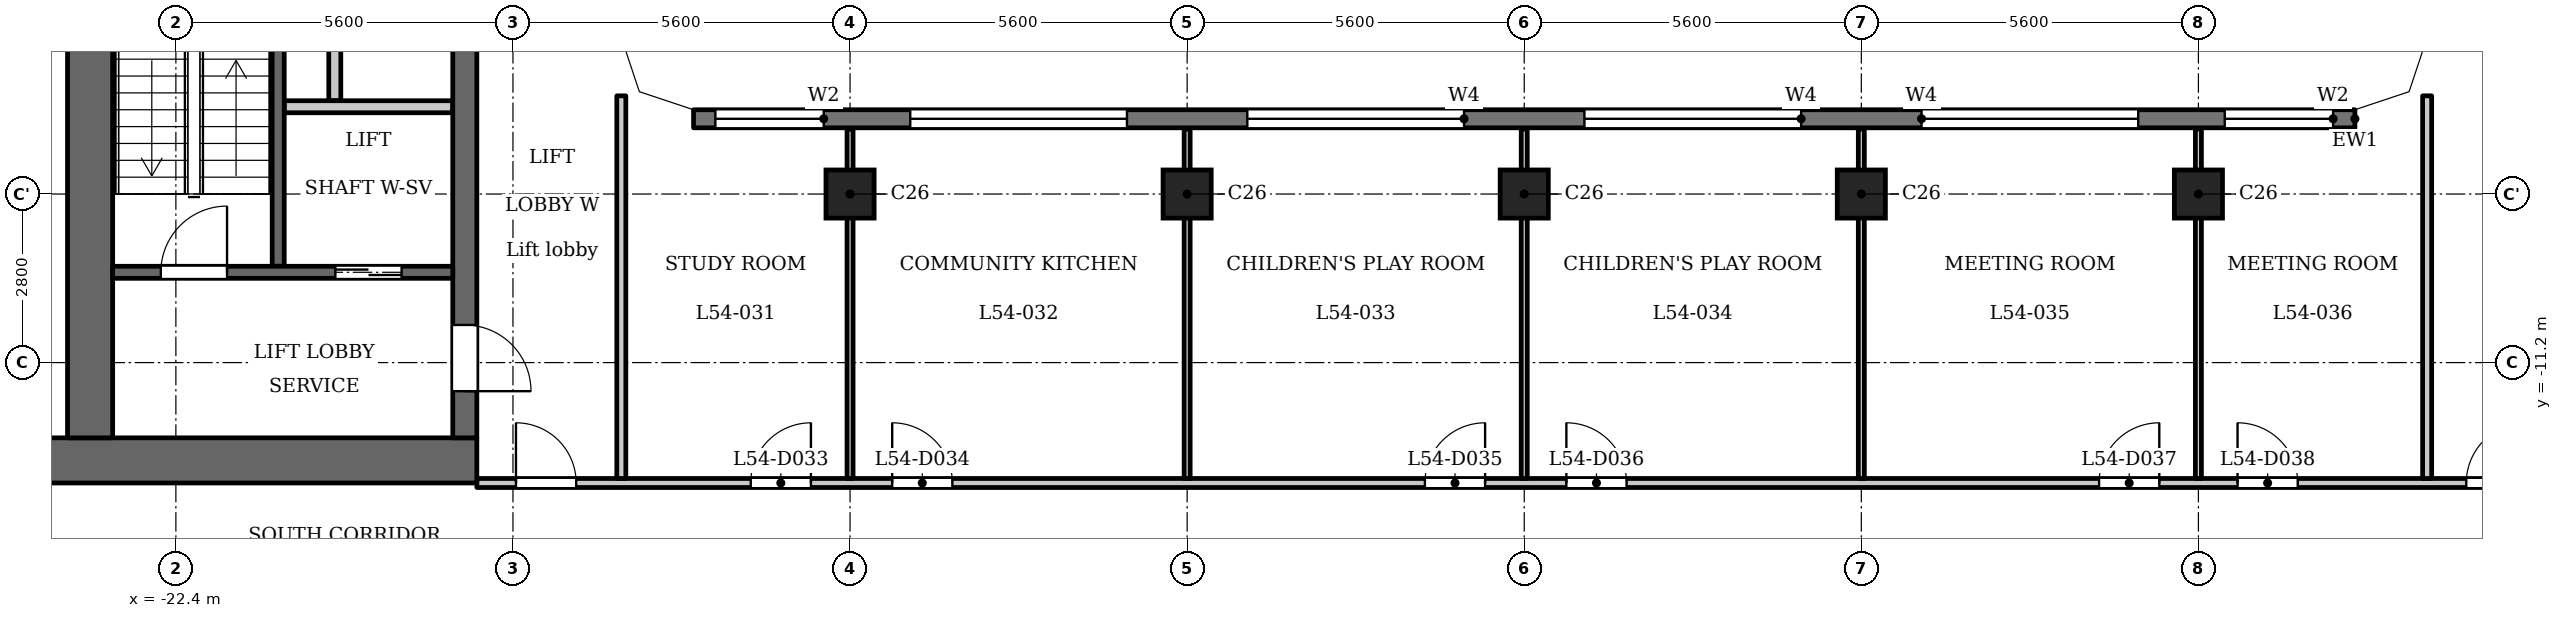
"""IFC4 building model, lengths in metres.
Left out: names, types, materials, properties, quantities, classifications, styles, units other than length and angle.
Written with IfcOpenShell. Run it as: python <this file> out.ifc"""

import sys

from ifc_helpers import new_model, si_unit, direction, frame, frame_2d, origin, origin_2d, place, context, subcontext, project, spatial, polyline, rectangle, outline, extrude, element, fill, save


model = new_model("IFC4")
c1 = context("Model", 3, precision=1e-05, world=origin(), true_north=direction((0.0, 1.0)))
c2 = subcontext(c1, "Body", "Model", "MODEL_VIEW")
j1 = project(units=[si_unit("LENGTHUNIT", "METRE"), si_unit("PLANEANGLEUNIT", "RADIAN")], contexts=[c1])
p1 = place(None, origin())
s1 = spatial("IfcSite", under=j1, at=p1, CompositionType="ELEMENT")
p2 = place(p1, origin())
s2 = spatial("IfcBuilding", under=s1, at=p2, CompositionType="ELEMENT")
p3 = place(p2, frame((0.0, 0.0, 209.9)))
s3 = spatial("IfcBuildingStorey", under=s2, at=p3, CompositionType="ELEMENT", Elevation=209.9)
for number, where, z_axis, x_axis in (
    (1, (-11.2, -8.4, 0.0), (0.0, 0.0, 1.0), (1.0, 0.0, 0.0)),
    (2, (-5.6, -8.4, 0.0), (0.0, 0.0, 1.0), (1.0, 0.0, 0.0)),
    (3, (0.0, -8.4, 0.0), (0.0, 0.0, 1.0), (1.0, 0.0, 0.0)),
    (4, (5.6, -8.4, 0.0), (0.0, 0.0, 1.0), (1.0, 0.0, 0.0)),
    (5, (11.2, -8.4, 0.0), (0.0, 0.0, 1.0), (1.0, 0.0, 0.0)),
):
    element("IfcColumn", number, at=place(p3, frame(where, z_axis=z_axis, x_axis=x_axis)), inside=s3, PredefinedType="COLUMN", context=c2, shape_type="SweptSolid", body=[
        extrude(rectangle(XDim=0.8, YDim=0.8, at=origin_2d()), origin(), (0.0, 0.0, 1.0), 3.5),
    ])
p4 = place(p3, frame((13.8, -7.15, 0.0), z_axis=(0.0, 0.0, 1.0), x_axis=(-1.0, 0.0, 0.0)))
e6 = element("IfcWall", 6, at=p4, inside=s3, PredefinedType="SOLIDWALL", context=c2, shape_type="SweptSolid", body=[
    extrude(rectangle(XDim=27.6, YDim=0.3, at=frame_2d((13.8, 0.0))), origin(), (0.0, 0.0, 1.0), 3.2),
])
p5 = place(p4, frame((0.363, 0.0, 0.9)))
e7 = element("IfcOpeningElement", 7, at=p5, cuts=e6, PredefinedType="OPENING", context=c2, shape_type="SweptSolid", body=[
    extrude(rectangle(XDim=1.8, YDim=1.25, at=frame_2d((0.9, 0.625))), frame((0.0, 0.16, 0.0), z_axis=(0.0, -1.0, 0.0), x_axis=(1.0, 0.0, 0.0)), (0.0, 0.0, 1.0), 0.32),
])
p6 = place(p4, frame((3.6, 0.0, 1.2)))
e8 = element("IfcOpeningElement", 8, at=p6, cuts=e6, PredefinedType="OPENING", context=c2, shape_type="SweptSolid", body=[
    extrude(rectangle(XDim=3.6, YDim=0.95, at=frame_2d((1.8, 0.475))), frame((0.0, 0.16, 0.0), z_axis=(0.0, -1.0, 0.0), x_axis=(1.0, 0.0, 0.0)), (0.0, 0.0, 1.0), 0.32),
])
p7 = place(p4, frame((9.2, 0.0, 1.2)))
e9 = element("IfcOpeningElement", 9, at=p7, cuts=e6, PredefinedType="OPENING", context=c2, shape_type="SweptSolid", body=[
    extrude(rectangle(XDim=3.6, YDim=0.95, at=frame_2d((1.8, 0.475))), frame((0.0, 0.16, 0.0), z_axis=(0.0, -1.0, 0.0), x_axis=(1.0, 0.0, 0.0)), (0.0, 0.0, 1.0), 0.32),
])
p8 = place(p4, frame((14.8, 0.0, 1.2)))
e10 = element("IfcOpeningElement", 10, at=p8, cuts=e6, PredefinedType="OPENING", context=c2, shape_type="SweptSolid", body=[
    extrude(rectangle(XDim=3.6, YDim=0.95, at=frame_2d((1.8, 0.475))), frame((0.0, 0.16, 0.0), z_axis=(0.0, -1.0, 0.0), x_axis=(1.0, 0.0, 0.0)), (0.0, 0.0, 1.0), 0.32),
])
p9 = place(p4, frame((20.4, 0.0, 1.2)))
e11 = element("IfcOpeningElement", 11, at=p9, cuts=e6, PredefinedType="OPENING", context=c2, shape_type="SweptSolid", body=[
    extrude(rectangle(XDim=3.6, YDim=0.95, at=frame_2d((1.8, 0.475))), frame((0.0, 0.16, 0.0), z_axis=(0.0, -1.0, 0.0), x_axis=(1.0, 0.0, 0.0)), (0.0, 0.0, 1.0), 0.32),
])
p10 = place(p4, frame((25.438, 0.0, 0.9)))
e12 = element("IfcOpeningElement", 12, at=p10, cuts=e6, PredefinedType="OPENING", context=c2, shape_type="SweptSolid", body=[
    extrude(rectangle(XDim=1.8, YDim=1.25, at=frame_2d((0.9, 0.625))), frame((0.0, 0.16, 0.0), z_axis=(0.0, -1.0, 0.0), x_axis=(1.0, 0.0, 0.0)), (0.0, 0.0, 1.0), 0.32),
])
p11 = place(p3, frame((-20.7, -9.6, 0.0), z_axis=(0.0, 0.0, 1.0), x_axis=(0.0, 1.0, 0.0)))
e13 = element("IfcWall", 13, at=p11, inside=s3, PredefinedType="SHEAR", context=c2, shape_type="SweptSolid", body=[
    extrude(rectangle(XDim=9.75, YDim=0.2, at=frame_2d((4.875, 0.0))), origin(), (0.0, 0.0, 1.0), 3.2),
])
p12 = place(p3, frame((-17.4, -12.825, 0.0), z_axis=(0.0, 0.0, 1.0), x_axis=(-1.0, 0.0, 0.0)))
e14 = element("IfcWall", 14, at=p12, inside=s3, PredefinedType="SHEAR", context=c2, shape_type="SweptSolid", body=[
    extrude(rectangle(XDim=7.6, YDim=0.75, at=frame_2d((3.8, 0.0))), origin(), (0.0, 0.0, 1.0), 3.2),
])
p13 = place(p3, frame((-19.76, -6.85, 0.0), z_axis=(0.0, 0.0, 1.0), x_axis=(0.0, 1.0, 0.0)))
e15 = element("IfcWall", 15, at=p13, inside=s3, PredefinedType="PARTITIONING", context=c2, shape_type="SweptSolid", body=[
    extrude(rectangle(XDim=7.0, YDim=0.2, at=frame_2d((3.5, 0.0))), origin(), (0.0, 0.0, 1.0), 3.2),
])
p14 = place(p3, frame((-17.6, -12.45, 0.0), z_axis=(0.0, 0.0, 1.0), x_axis=(0.0, 1.0, 0.0)))
e16 = element("IfcWall", 16, at=p14, inside=s3, PredefinedType="SHEAR", context=c2, shape_type="SweptSolid", body=[
    extrude(rectangle(XDim=24.9, YDim=0.4, at=frame_2d((12.45, 0.0))), origin(), (0.0, 0.0, 1.0), 3.2),
])
p15 = place(p14, frame((8.65, 0.0, 0.0)))
e17 = element("IfcOpeningElement", 17, at=p15, cuts=e16, PredefinedType="OPENING", context=c2, shape_type="SweptSolid", body=[
    extrude(rectangle(XDim=0.9, YDim=2.1, at=frame_2d((0.45, 1.05))), frame((0.0, 0.21, 0.0), z_axis=(0.0, -1.0, 0.0), x_axis=(1.0, 0.0, 0.0)), (0.0, 0.0, 1.0), 0.42),
])
p16 = place(p14, frame((15.6, 0.0, 0.0)))
e18 = element("IfcOpeningElement", 18, at=p16, cuts=e16, PredefinedType="OPENING", context=c2, shape_type="SweptSolid", body=[
    extrude(rectangle(XDim=1.1, YDim=2.1, at=frame_2d((0.55, 1.05))), frame((0.0, 0.21, 0.0), z_axis=(0.0, -1.0, 0.0), x_axis=(1.0, 0.0, 0.0)), (0.0, 0.0, 1.0), 0.42),
])
p17 = place(p14, frame((18.0, 0.0, 0.0)))
e19 = element("IfcOpeningElement", 19, at=p17, cuts=e16, PredefinedType="OPENING", context=c2, shape_type="SweptSolid", body=[
    extrude(rectangle(XDim=1.1, YDim=2.1, at=frame_2d((0.55, 1.05))), frame((0.0, 0.21, 0.0), z_axis=(0.0, -1.0, 0.0), x_axis=(1.0, 0.0, 0.0)), (0.0, 0.0, 1.0), 0.42),
])
p18 = place(p14, frame((23.025, 0.0, 0.0)))
e20 = element("IfcOpeningElement", 20, at=p18, cuts=e16, PredefinedType="OPENING", context=c2, shape_type="SweptSolid", body=[
    extrude(rectangle(XDim=1.1, YDim=2.1, at=frame_2d((0.55, 1.05))), frame((0.0, 0.21, 0.0), z_axis=(0.0, -1.0, 0.0), x_axis=(1.0, 0.0, 0.0)), (0.0, 0.0, 1.0), 0.42),
])
p19 = place(p14, frame((0.775, 0.0, 0.0)))
e21 = element("IfcOpeningElement", 21, at=p19, cuts=e16, PredefinedType="OPENING", context=c2, shape_type="SweptSolid", body=[
    extrude(rectangle(XDim=1.1, YDim=2.1, at=frame_2d((0.55, 1.05))), frame((0.0, 0.21, 0.0), z_axis=(0.0, -1.0, 0.0), x_axis=(1.0, 0.0, 0.0)), (0.0, 0.0, 1.0), 0.42),
])
p20 = place(p14, frame((12.925, 0.0, 0.0)))
e22 = element("IfcOpeningElement", 22, at=p20, cuts=e16, PredefinedType="OPENING", context=c2, shape_type="SweptSolid", body=[
    extrude(rectangle(XDim=1.8, YDim=2.1, at=frame_2d((0.9, 1.05))), frame((0.0, 0.21, 0.0), z_axis=(0.0, -1.0, 0.0), x_axis=(1.0, 0.0, 0.0)), (0.0, 0.0, 1.0), 0.42),
])
p21 = place(p3, frame((-23.825, -12.45, 0.0), z_axis=(0.0, 0.0, 1.0), x_axis=(0.0, 1.0, 0.0)))
e23 = element("IfcWall", 23, at=p21, inside=s3, PredefinedType="SHEAR", context=c2, shape_type="SweptSolid", body=[
    extrude(rectangle(XDim=24.9, YDim=0.75, at=frame_2d((12.45, 0.0))), origin(), (0.0, 0.0, 1.0), 3.2),
])
p22 = place(p3, frame((-17.8, -9.7, 0.0), z_axis=(0.0, 0.0, 1.0), x_axis=(-1.0, 0.0, 0.0)))
e24 = element("IfcWall", 24, at=p22, inside=s3, PredefinedType="SHEAR", context=c2, shape_type="SweptSolid", body=[
    extrude(rectangle(XDim=5.65, YDim=0.2, at=frame_2d((2.825, 0.0))), origin(), (0.0, 0.0, 1.0), 3.2),
])
p23 = place(p22, frame((0.85, 0.0, 0.0)))
e25 = element("IfcOpeningElement", 25, at=p23, cuts=e24, PredefinedType="OPENING", context=c2, shape_type="SweptSolid", body=[
    extrude(rectangle(XDim=1.1, YDim=2.1, at=frame_2d((0.55, 1.05))), frame((0.0, 0.11, 0.0), z_axis=(0.0, -1.0, 0.0), x_axis=(1.0, 0.0, 0.0)), (0.0, 0.0, 1.0), 0.22),
])
p24 = place(p22, frame((3.75, 0.0, 0.0)))
e26 = element("IfcOpeningElement", 26, at=p24, cuts=e24, PredefinedType="OPENING", context=c2, shape_type="SweptSolid", body=[
    extrude(rectangle(XDim=1.1, YDim=2.1, at=frame_2d((0.55, 1.05))), frame((0.0, 0.11, 0.0), z_axis=(0.0, -1.0, 0.0), x_axis=(1.0, 0.0, 0.0)), (0.0, 0.0, 1.0), 0.22),
])
p25 = place(p3, frame((-17.8, -6.95, 0.0), z_axis=(0.0, 0.0, 1.0), x_axis=(-1.0, 0.0, 0.0)))
e27 = element("IfcWall", 27, at=p25, inside=s3, PredefinedType="PARTITIONING", context=c2, shape_type="SweptSolid", body=[
    extrude(rectangle(XDim=2.8, YDim=0.2, at=frame_2d((1.4, 0.0))), origin(), (0.0, 0.0, 1.0), 3.2),
])
p26 = place(p3, frame((-17.4, -13.2, 0.0), z_axis=(0.0, 0.0, 1.0), x_axis=(1.0, 0.0, 0.0)))
e28 = element("IfcWall", 28, at=p26, inside=s3, PredefinedType="PARTITIONING", context=c2, shape_type="SweptSolid", body=[
    extrude(rectangle(XDim=34.8, YDim=0.15, at=frame_2d((17.4, 0.0))), origin(), (0.0, 0.0, 1.0), 3.2),
])
p27 = place(p26, frame((0.65, 0.0, 0.0)))
e29 = element("IfcOpeningElement", 29, at=p27, cuts=e28, PredefinedType="OPENING", context=c2, shape_type="SweptSolid", body=[
    extrude(rectangle(XDim=1.0, YDim=2.1, at=frame_2d((0.5, 1.05))), frame((0.0, 0.085, 0.0), z_axis=(0.0, -1.0, 0.0), x_axis=(1.0, 0.0, 0.0)), (0.0, 0.0, 1.0), 0.17),
])
p28 = place(p26, frame((33.05, 0.0, 0.0)))
e30 = element("IfcOpeningElement", 30, at=p28, cuts=e28, PredefinedType="OPENING", context=c2, shape_type="SweptSolid", body=[
    extrude(rectangle(XDim=1.0, YDim=2.1, at=frame_2d((0.5, 1.05))), frame((0.0, 0.085, 0.0), z_axis=(0.0, -1.0, 0.0), x_axis=(1.0, 0.0, 0.0)), (0.0, 0.0, 1.0), 0.17),
])
p29 = place(p26, frame((4.55, 0.0, 0.0)))
e31 = element("IfcOpeningElement", 31, at=p29, cuts=e28, PredefinedType="OPENING", context=c2, shape_type="SweptSolid", body=[
    extrude(rectangle(XDim=1.0, YDim=2.1, at=frame_2d((0.5, 1.05))), frame((0.0, 0.085, 0.0), z_axis=(0.0, -1.0, 0.0), x_axis=(1.0, 0.0, 0.0)), (0.0, 0.0, 1.0), 0.17),
])
p30 = place(p26, frame((6.9, 0.0, 0.0)))
e32 = element("IfcOpeningElement", 32, at=p30, cuts=e28, PredefinedType="OPENING", context=c2, shape_type="SweptSolid", body=[
    extrude(rectangle(XDim=1.0, YDim=2.1, at=frame_2d((0.5, 1.05))), frame((0.0, 0.085, 0.0), z_axis=(0.0, -1.0, 0.0), x_axis=(1.0, 0.0, 0.0)), (0.0, 0.0, 1.0), 0.17),
])
p31 = place(p26, frame((15.75, 0.0, 0.0)))
e33 = element("IfcOpeningElement", 33, at=p31, cuts=e28, PredefinedType="OPENING", context=c2, shape_type="SweptSolid", body=[
    extrude(rectangle(XDim=1.0, YDim=2.1, at=frame_2d((0.5, 1.05))), frame((0.0, 0.085, 0.0), z_axis=(0.0, -1.0, 0.0), x_axis=(1.0, 0.0, 0.0)), (0.0, 0.0, 1.0), 0.17),
])
p32 = place(p26, frame((18.1, 0.0, 0.0)))
e34 = element("IfcOpeningElement", 34, at=p32, cuts=e28, PredefinedType="OPENING", context=c2, shape_type="SweptSolid", body=[
    extrude(rectangle(XDim=1.0, YDim=2.1, at=frame_2d((0.5, 1.05))), frame((0.0, 0.085, 0.0), z_axis=(0.0, -1.0, 0.0), x_axis=(1.0, 0.0, 0.0)), (0.0, 0.0, 1.0), 0.17),
])
p33 = place(p26, frame((26.95, 0.0, 0.0)))
e35 = element("IfcOpeningElement", 35, at=p33, cuts=e28, PredefinedType="OPENING", context=c2, shape_type="SweptSolid", body=[
    extrude(rectangle(XDim=1.0, YDim=2.1, at=frame_2d((0.5, 1.05))), frame((0.0, 0.085, 0.0), z_axis=(0.0, -1.0, 0.0), x_axis=(1.0, 0.0, 0.0)), (0.0, 0.0, 1.0), 0.17),
])
p34 = place(p26, frame((29.25, 0.0, 0.0)))
e36 = element("IfcOpeningElement", 36, at=p34, cuts=e28, PredefinedType="OPENING", context=c2, shape_type="SweptSolid", body=[
    extrude(rectangle(XDim=1.0, YDim=2.1, at=frame_2d((0.5, 1.05))), frame((0.0, 0.085, 0.0), z_axis=(0.0, -1.0, 0.0), x_axis=(1.0, 0.0, 0.0)), (0.0, 0.0, 1.0), 0.17),
])
p35 = place(p3, frame((-15.0, -13.125, 0.0), z_axis=(0.0, 0.0, 1.0), x_axis=(0.0, 1.0, 0.0)))
e37 = element("IfcWall", 37, at=p35, inside=s3, PredefinedType="PARTITIONING", context=c2, shape_type="SweptSolid", body=[
    extrude(rectangle(XDim=6.356, YDim=0.15, at=frame_2d((3.178, 0.0))), origin(), (0.0, 0.0, 1.0), 3.2),
])
for number, where, z_axis, x_axis in (
    (38, (-11.2, -13.125, 0.0), (0.0, 0.0, 1.0), (0.0, 1.0, 0.0)),
    (39, (-5.6, -13.125, 0.0), (0.0, 0.0, 1.0), (0.0, 1.0, 0.0)),
    (40, (0.0, -13.125, 0.0), (0.0, 0.0, 1.0), (0.0, 1.0, 0.0)),
    (41, (5.6, -13.125, 0.0), (0.0, 0.0, 1.0), (0.0, 1.0, 0.0)),
    (42, (11.2, -13.125, 0.0), (0.0, 0.0, 1.0), (0.0, 1.0, 0.0)),
):
    element("IfcWall", number, at=place(p3, frame(where, z_axis=z_axis, x_axis=x_axis)), inside=s3, PredefinedType="PARTITIONING", context=c2, shape_type="SweptSolid", body=[
        extrude(rectangle(XDim=5.805, YDim=0.1, at=frame_2d((2.902, 0.0))), origin(), (0.0, 0.0, 1.0), 3.2),
    ])
p36 = place(p3, frame((15.0, -13.125, 0.0), z_axis=(0.0, 0.0, 1.0), x_axis=(0.0, 1.0, 0.0)))
e43 = element("IfcWall", 43, at=p36, inside=s3, PredefinedType="PARTITIONING", context=c2, shape_type="SweptSolid", body=[
    extrude(rectangle(XDim=6.356, YDim=0.15, at=frame_2d((3.178, 0.0))), origin(), (0.0, 0.0, 1.0), 3.2),
])
p37 = place(p3, origin())
e44 = element("IfcWall", 44, at=p37, inside=s3, PredefinedType="SOLIDWALL", context=c2, shape_type="SweptSolid", body=[
    extrude(outline(polyline([(14.937, -6.937), (15.3, -5.849), (15.3, -5.8), (15.0, -5.8), (14.7, -6.7), (13.8, -7.0), (13.8, -7.3), (13.849, -7.3), (14.937, -6.937)])), origin(), (0.0, 0.0, 1.0), 3.2),
])
e45 = element("IfcWall", 45, at=p37, inside=s3, PredefinedType="SOLIDWALL", context=c2, shape_type="SweptSolid", body=[
    extrude(outline(polyline([(-14.937, -6.937), (-13.849, -7.3), (-13.8, -7.3), (-13.8, -7.0), (-14.7, -6.7), (-15.0, -5.8), (-15.3, -5.8), (-15.3, -5.849), (-14.937, -6.937)])), origin(), (0.0, 0.0, 1.0), 3.2),
])
p38 = place(p23, origin())
e46 = element("IfcDoor", 46, at=p38, inside=s3, OperationType="DOUBLE_DOOR_SLIDING", PredefinedType="DOOR", context=c2, shape_type="SweptSolid", body=[
    extrude(rectangle(XDim=1.1, YDim=2.1, at=frame_2d((0.55, 1.05))), frame((0.0, 0.025, 0.0), z_axis=(0.0, -1.0, 0.0), x_axis=(1.0, 0.0, 0.0)), (0.0, 0.0, 1.0), 0.05),
])
fill(e25, e46)
p39 = place(p19, origin())
e47 = element("IfcDoor", 47, at=p39, inside=s3, OperationType="SINGLE_SWING_LEFT", PredefinedType="DOOR", context=c2, shape_type="SweptSolid", body=[
    extrude(rectangle(XDim=1.1, YDim=2.1, at=frame_2d((0.55, 1.05))), frame((0.0, 0.025, 0.0), z_axis=(0.0, -1.0, 0.0), x_axis=(1.0, 0.0, 0.0)), (0.0, 0.0, 1.0), 0.05),
])
fill(e21, e47)
p40 = place(p24, origin())
e48 = element("IfcDoor", 48, at=p40, inside=s3, OperationType="SINGLE_SWING_LEFT", PredefinedType="DOOR", context=c2, shape_type="SweptSolid", body=[
    extrude(rectangle(XDim=1.1, YDim=2.1, at=frame_2d((0.55, 1.05))), frame((0.0, 0.025, 0.0), z_axis=(0.0, -1.0, 0.0), x_axis=(1.0, 0.0, 0.0)), (0.0, 0.0, 1.0), 0.05),
])
fill(e26, e48)
p41 = place(p27, origin())
e49 = element("IfcDoor", 49, at=p41, inside=s3, OperationType="SINGLE_SWING_RIGHT", PredefinedType="DOOR", context=c2, shape_type="SweptSolid", body=[
    extrude(rectangle(XDim=1.0, YDim=2.1, at=frame_2d((0.5, 1.05))), frame((0.0, 0.025, 0.0), z_axis=(0.0, -1.0, 0.0), x_axis=(1.0, 0.0, 0.0)), (0.0, 0.0, 1.0), 0.05),
])
fill(e29, e49)
p42 = place(p28, origin())
e50 = element("IfcDoor", 50, at=p42, inside=s3, OperationType="SINGLE_SWING_LEFT", PredefinedType="DOOR", context=c2, shape_type="SweptSolid", body=[
    extrude(rectangle(XDim=1.0, YDim=2.1, at=frame_2d((0.5, 1.05))), frame((0.0, 0.025, 0.0), z_axis=(0.0, -1.0, 0.0), x_axis=(1.0, 0.0, 0.0)), (0.0, 0.0, 1.0), 0.05),
])
fill(e30, e50)
p43 = place(p29, origin())
e51 = element("IfcDoor", 51, at=p43, inside=s3, OperationType="SINGLE_SWING_LEFT", PredefinedType="DOOR", context=c2, shape_type="SweptSolid", body=[
    extrude(rectangle(XDim=1.0, YDim=2.1, at=frame_2d((0.5, 1.05))), frame((0.0, 0.025, 0.0), z_axis=(0.0, -1.0, 0.0), x_axis=(1.0, 0.0, 0.0)), (0.0, 0.0, 1.0), 0.05),
])
fill(e31, e51)
p44 = place(p30, origin())
e52 = element("IfcDoor", 52, at=p44, inside=s3, OperationType="SINGLE_SWING_RIGHT", PredefinedType="DOOR", context=c2, shape_type="SweptSolid", body=[
    extrude(rectangle(XDim=1.0, YDim=2.1, at=frame_2d((0.5, 1.05))), frame((0.0, 0.025, 0.0), z_axis=(0.0, -1.0, 0.0), x_axis=(1.0, 0.0, 0.0)), (0.0, 0.0, 1.0), 0.05),
])
fill(e32, e52)
p45 = place(p31, origin())
e53 = element("IfcDoor", 53, at=p45, inside=s3, OperationType="SINGLE_SWING_LEFT", PredefinedType="DOOR", context=c2, shape_type="SweptSolid", body=[
    extrude(rectangle(XDim=1.0, YDim=2.1, at=frame_2d((0.5, 1.05))), frame((0.0, 0.025, 0.0), z_axis=(0.0, -1.0, 0.0), x_axis=(1.0, 0.0, 0.0)), (0.0, 0.0, 1.0), 0.05),
])
fill(e33, e53)
p46 = place(p32, origin())
e54 = element("IfcDoor", 54, at=p46, inside=s3, OperationType="SINGLE_SWING_RIGHT", PredefinedType="DOOR", context=c2, shape_type="SweptSolid", body=[
    extrude(rectangle(XDim=1.0, YDim=2.1, at=frame_2d((0.5, 1.05))), frame((0.0, 0.025, 0.0), z_axis=(0.0, -1.0, 0.0), x_axis=(1.0, 0.0, 0.0)), (0.0, 0.0, 1.0), 0.05),
])
fill(e34, e54)
p47 = place(p33, origin())
e55 = element("IfcDoor", 55, at=p47, inside=s3, OperationType="SINGLE_SWING_LEFT", PredefinedType="DOOR", context=c2, shape_type="SweptSolid", body=[
    extrude(rectangle(XDim=1.0, YDim=2.1, at=frame_2d((0.5, 1.05))), frame((0.0, 0.025, 0.0), z_axis=(0.0, -1.0, 0.0), x_axis=(1.0, 0.0, 0.0)), (0.0, 0.0, 1.0), 0.05),
])
fill(e35, e55)
p48 = place(p34, origin())
e56 = element("IfcDoor", 56, at=p48, inside=s3, OperationType="SINGLE_SWING_RIGHT", PredefinedType="DOOR", context=c2, shape_type="SweptSolid", body=[
    extrude(rectangle(XDim=1.0, YDim=2.1, at=frame_2d((0.5, 1.05))), frame((0.0, 0.025, 0.0), z_axis=(0.0, -1.0, 0.0), x_axis=(1.0, 0.0, 0.0)), (0.0, 0.0, 1.0), 0.05),
])
fill(e36, e56)
p49 = place(p5, origin())
e57 = element("IfcWindow", 57, at=p49, inside=s3, PartitioningType="SINGLE_PANEL", PredefinedType="WINDOW", context=c2, shape_type="SweptSolid", body=[
    extrude(rectangle(XDim=1.8, YDim=1.25, at=frame_2d((0.9, 0.625))), frame((0.0, 0.03, 0.0), z_axis=(0.0, -1.0, 0.0), x_axis=(1.0, 0.0, 0.0)), (0.0, 0.0, 1.0), 0.06),
])
fill(e7, e57)
p50 = place(p6, origin())
e58 = element("IfcWindow", 58, at=p50, inside=s3, PartitioningType="SINGLE_PANEL", PredefinedType="WINDOW", context=c2, shape_type="SweptSolid", body=[
    extrude(rectangle(XDim=3.6, YDim=0.95, at=frame_2d((1.8, 0.475))), frame((0.0, 0.03, 0.0), z_axis=(0.0, -1.0, 0.0), x_axis=(1.0, 0.0, 0.0)), (0.0, 0.0, 1.0), 0.06),
])
fill(e8, e58)
p51 = place(p7, origin())
e59 = element("IfcWindow", 59, at=p51, inside=s3, PartitioningType="SINGLE_PANEL", PredefinedType="WINDOW", context=c2, shape_type="SweptSolid", body=[
    extrude(rectangle(XDim=3.6, YDim=0.95, at=frame_2d((1.8, 0.475))), frame((0.0, 0.03, 0.0), z_axis=(0.0, -1.0, 0.0), x_axis=(1.0, 0.0, 0.0)), (0.0, 0.0, 1.0), 0.06),
])
fill(e9, e59)
p52 = place(p8, origin())
e60 = element("IfcWindow", 60, at=p52, inside=s3, PartitioningType="SINGLE_PANEL", PredefinedType="WINDOW", context=c2, shape_type="SweptSolid", body=[
    extrude(rectangle(XDim=3.6, YDim=0.95, at=frame_2d((1.8, 0.475))), frame((0.0, 0.03, 0.0), z_axis=(0.0, -1.0, 0.0), x_axis=(1.0, 0.0, 0.0)), (0.0, 0.0, 1.0), 0.06),
])
fill(e10, e60)
p53 = place(p9, origin())
e61 = element("IfcWindow", 61, at=p53, inside=s3, PartitioningType="SINGLE_PANEL", PredefinedType="WINDOW", context=c2, shape_type="SweptSolid", body=[
    extrude(rectangle(XDim=3.6, YDim=0.95, at=frame_2d((1.8, 0.475))), frame((0.0, 0.03, 0.0), z_axis=(0.0, -1.0, 0.0), x_axis=(1.0, 0.0, 0.0)), (0.0, 0.0, 1.0), 0.06),
])
fill(e11, e61)
p54 = place(p10, origin())
e62 = element("IfcWindow", 62, at=p54, inside=s3, PartitioningType="SINGLE_PANEL", PredefinedType="WINDOW", context=c2, shape_type="SweptSolid", body=[
    extrude(rectangle(XDim=1.8, YDim=1.25, at=frame_2d((0.9, 0.625))), frame((0.0, 0.03, 0.0), z_axis=(0.0, -1.0, 0.0), x_axis=(1.0, 0.0, 0.0)), (0.0, 0.0, 1.0), 0.06),
])
fill(e12, e62)
save(model, sys.argv[1])
